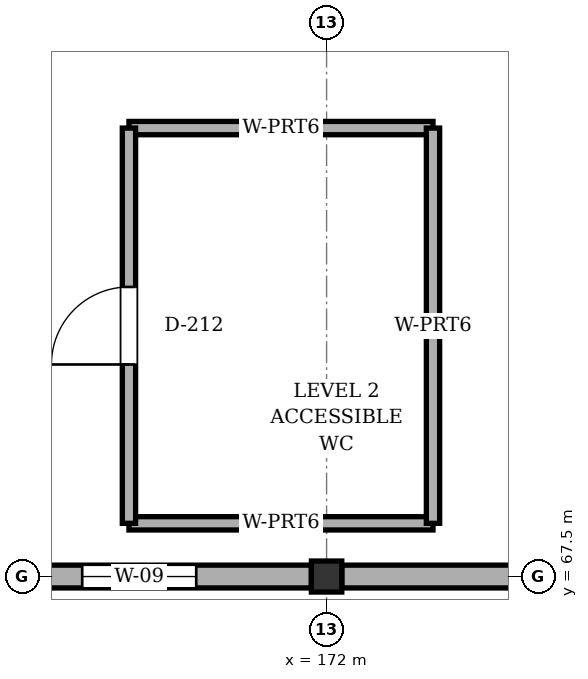
"""IFC4 building model, lengths in metres.
Left out: names, types, materials, properties, quantities, classifications, styles, units other than length and angle.
Written with IfcOpenShell. Run it as: python <this file> out.ifc"""

import sys

from ifc_helpers import new_model, si_unit, direction, frame, frame_2d, origin, origin_2d, place, context, subcontext, project, spatial, rectangle, i_section, extrude, element, fill, save


model = new_model("IFC4")
c1 = context("Model", 3, precision=1e-05, world=origin(), true_north=direction((0.0, 1.0)))
c2 = subcontext(c1, "Body", "Model", "MODEL_VIEW")
j1 = project(units=[si_unit("LENGTHUNIT", "METRE"), si_unit("PLANEANGLEUNIT", "RADIAN")], contexts=[c1])
p1 = place(None, origin())
s1 = spatial("IfcSite", under=j1, at=p1, CompositionType="ELEMENT")
p2 = place(p1, origin())
s2 = spatial("IfcBuilding", under=s1, at=p2, CompositionType="ELEMENT")
p3 = place(p2, frame((0.0, 0.0, 10.8)))
s3 = spatial("IfcBuildingStorey", under=s2, at=p3, CompositionType="ELEMENT", Elevation=10.8)
p4 = place(p3, frame((172.0, 67.5, 0.0), z_axis=(0.0, 0.0, 1.0), x_axis=(1.0, 0.0, 0.0)))
e1 = element("IfcColumn", 1, at=p4, inside=s3, PredefinedType="COLUMN", context=c2, shape_type="SweptSolid", body=[
    extrude(i_section(OverallWidth=0.4, OverallDepth=0.408, WebThickness=0.021, FlangeThickness=0.021, FilletRadius=0.022, at=origin_2d()), origin(), (0.0, 0.0, 1.0), 3.6),
])
p5 = place(p3, frame((179.8, 67.5, 0.0), z_axis=(0.0, 0.0, 1.0), x_axis=(-1.0, 0.0, 0.0)))
e2 = element("IfcWall", 2, at=p5, inside=s3, PredefinedType="SOLIDWALL", context=c2, shape_type="SweptSolid", body=[
    extrude(rectangle(XDim=7.6, YDim=0.3, at=frame_2d((3.8, 0.0))), origin(), (0.0, 0.0, 1.0), 2.915),
])
p6 = place(p5, frame((2.9, 0.0, 0.9)))
e3 = element("IfcOpeningElement", 3, at=p6, cuts=e2, PredefinedType="OPENING", context=c2, shape_type="SweptSolid", body=[
    extrude(rectangle(XDim=1.8, YDim=1.6, at=frame_2d((0.9, 0.8))), frame((0.0, 0.16, 0.0), z_axis=(0.0, -1.0, 0.0), x_axis=(1.0, 0.0, 0.0)), (0.0, 0.0, 1.0), 0.32),
])
p7 = place(p3, frame((171.8, 67.5, 0.0), z_axis=(0.0, 0.0, 1.0), x_axis=(-1.0, 0.0, 0.0)))
e4 = element("IfcWall", 4, at=p7, inside=s3, PredefinedType="SOLIDWALL", context=c2, shape_type="SweptSolid", body=[
    extrude(rectangle(XDim=8.6, YDim=0.3, at=frame_2d((4.3, 0.0))), origin(), (0.0, 0.0, 1.0), 2.915),
])
p8 = place(p7, frame((1.515, 0.0, 0.9)))
e5 = element("IfcOpeningElement", 5, at=p8, cuts=e4, PredefinedType="OPENING", context=c2, shape_type="SweptSolid", body=[
    extrude(rectangle(XDim=1.5, YDim=1.6, at=frame_2d((0.75, 0.8))), frame((0.0, 0.16, 0.0), z_axis=(0.0, -1.0, 0.0), x_axis=(1.0, 0.0, 0.0)), (0.0, 0.0, 1.0), 0.32),
])
p9 = place(p7, frame((5.735, 0.0, 0.9)))
e6 = element("IfcOpeningElement", 6, at=p9, cuts=e4, PredefinedType="OPENING", context=c2, shape_type="SweptSolid", body=[
    extrude(rectangle(XDim=1.2, YDim=1.6, at=frame_2d((0.6, 0.8))), frame((0.0, 0.16, 0.0), z_axis=(0.0, -1.0, 0.0), x_axis=(1.0, 0.0, 0.0)), (0.0, 0.0, 1.0), 0.32),
])
p10 = place(p3, frame((173.4, 68.2, 0.0), z_axis=(0.0, 0.0, 1.0), x_axis=(-1.0, 0.0, 0.0)))
e7 = element("IfcWall", 7, at=p10, inside=s3, PredefinedType="PARTITIONING", context=c2, shape_type="SweptSolid", body=[
    extrude(rectangle(XDim=4.0, YDim=0.175, at=frame_2d((2.0, 0.0))), origin(), (0.0, 0.0, 1.0), 2.915),
])
p11 = place(p3, frame((169.4, 73.4, 0.0), z_axis=(0.0, 0.0, 1.0), x_axis=(1.0, 0.0, 0.0)))
e8 = element("IfcWall", 8, at=p11, inside=s3, PredefinedType="PARTITIONING", context=c2, shape_type="SweptSolid", body=[
    extrude(rectangle(XDim=4.0, YDim=0.175, at=frame_2d((2.0, 0.0))), origin(), (0.0, 0.0, 1.0), 2.965),
])
p12 = place(p3, frame((169.4, 68.2, 0.0), z_axis=(0.0, 0.0, 1.0), x_axis=(0.0, 1.0, 0.0)))
e9 = element("IfcWall", 9, at=p12, inside=s3, PredefinedType="PARTITIONING", context=c2, shape_type="SweptSolid", body=[
    extrude(rectangle(XDim=5.2, YDim=0.175, at=frame_2d((2.6, 0.0))), origin(), (0.0, 0.0, 1.0), 2.915),
])
p13 = place(p12, frame((2.09, 0.0, 0.0)))
e10 = element("IfcOpeningElement", 10, at=p13, cuts=e9, PredefinedType="OPENING", context=c2, shape_type="SweptSolid", body=[
    extrude(rectangle(XDim=1.02, YDim=2.05, at=frame_2d((0.51, 1.025))), frame((0.0, 0.097, 0.0), z_axis=(0.0, -1.0, 0.0), x_axis=(1.0, 0.0, 0.0)), (0.0, 0.0, 1.0), 0.195),
])
p14 = place(p3, frame((173.4, 73.4, 0.0), z_axis=(0.0, 0.0, 1.0), x_axis=(0.0, -1.0, 0.0)))
e11 = element("IfcWall", 11, at=p14, inside=s3, PredefinedType="PARTITIONING", context=c2, shape_type="SweptSolid", body=[
    extrude(rectangle(XDim=5.2, YDim=0.175, at=frame_2d((2.6, 0.0))), origin(), (0.0, 0.0, 1.0), 2.915),
])
p15 = place(p8, origin())
e12 = element("IfcWindow", 12, at=p15, inside=s3, PartitioningType="SINGLE_PANEL", PredefinedType="WINDOW", context=c2, shape_type="SweptSolid", body=[
    extrude(rectangle(XDim=1.5, YDim=1.6, at=frame_2d((0.75, 0.8))), frame((0.0, 0.03, 0.0), z_axis=(0.0, -1.0, 0.0), x_axis=(1.0, 0.0, 0.0)), (0.0, 0.0, 1.0), 0.06),
])
fill(e5, e12)
p16 = place(p13, origin())
e13 = element("IfcDoor", 13, at=p16, inside=s3, OperationType="SINGLE_SWING_LEFT", PredefinedType="DOOR", context=c2, shape_type="SweptSolid", body=[
    extrude(rectangle(XDim=1.02, YDim=2.05, at=frame_2d((0.51, 1.025))), frame((0.0, 0.025, 0.0), z_axis=(0.0, -1.0, 0.0), x_axis=(1.0, 0.0, 0.0)), (0.0, 0.0, 1.0), 0.05),
])
fill(e10, e13)
save(model, sys.argv[1])
